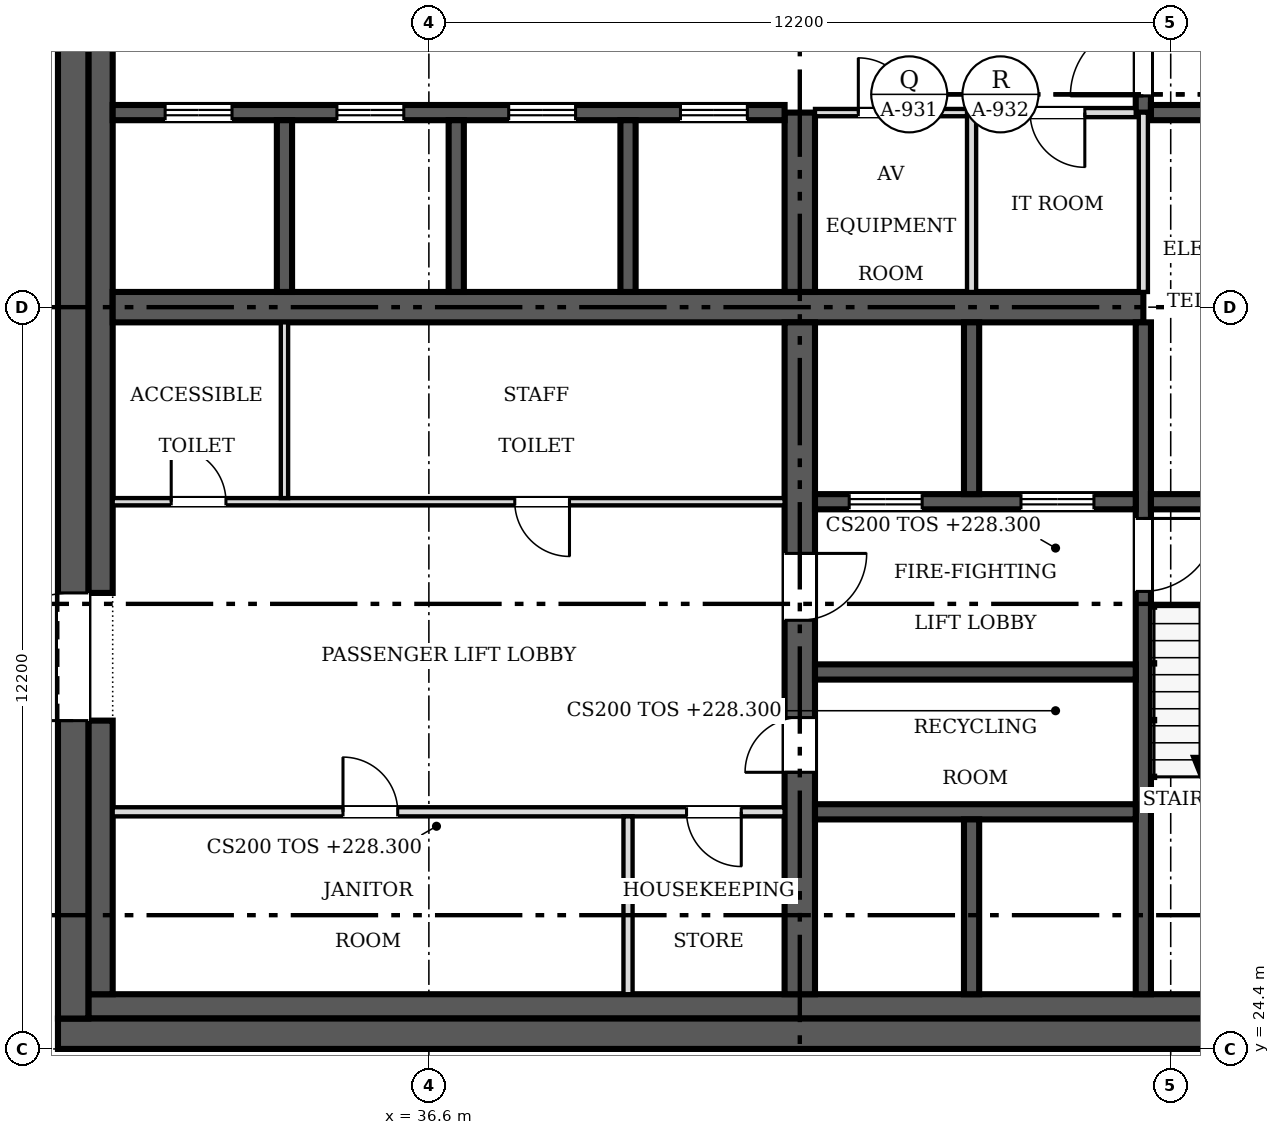
"""IFC4 building model, lengths in metres.
Left out: names, types, materials, properties, quantities, classifications, styles, units other than length and angle.
Written with IfcOpenShell. Run it as: python <this file> out.ifc"""

import sys

from ifc_helpers import new_model, si_unit, direction, frame, frame_2d, origin, place, context, subcontext, project, spatial, rectangle, extrude, source, transform, mapped, element, fill, save


model = new_model("IFC4")
c1 = context("Model", 3, precision=1e-05, world=origin(), true_north=direction((0.0, 1.0)))
c2 = subcontext(c1, "Body", "Model", "MODEL_VIEW")
j1 = project(units=[si_unit("LENGTHUNIT", "METRE"), si_unit("PLANEANGLEUNIT", "RADIAN")], contexts=[c1])
p1 = place(None, origin())
s1 = spatial("IfcSite", under=j1, at=p1, CompositionType="ELEMENT")
p2 = place(p1, origin())
s2 = spatial("IfcBuilding", under=s1, at=p2, CompositionType="ELEMENT")
p3 = place(p2, frame((0.0, 0.0, 228.3)))
s3 = spatial("IfcBuildingStorey", under=s2, at=p3, CompositionType="ELEMENT", Elevation=228.3)
p4 = place(p3, frame((54.9, 24.65, 0.0), z_axis=(0.0, 0.0, 1.0), x_axis=(-1.0, 0.0, 0.0)))
e1 = element("IfcWall", 1, at=p4, inside=s3, PredefinedType="SHEAR", context=c2, shape_type="SweptSolid", body=[
    extrude(rectangle(XDim=24.4, YDim=0.5, at=frame_2d((12.2, 0.0))), origin(), (0.0, 0.0, 1.0), 3.8),
])
m1 = source(origin(), c2, "Body", "SweptSolid", [
    extrude(rectangle(XDim=1.2, YDim=2.1, at=frame_2d((0.6, 1.05))), frame((0.0, 0.26, 0.0), z_axis=(0.0, -1.0, 0.0), x_axis=(1.0, 0.0, 0.0)), (0.0, 0.0, 1.0), 0.52),
])
p5 = place(p4, frame((1.5, 0.0, 0.0)))
e2 = element("IfcOpeningElement", 2, at=p5, cuts=e1, PredefinedType="OPENING", context=c2, shape_type="MappedRepresentation", body=[
    mapped(m1, transform((0.0, 0.0, 0.0), scale=1.0)),
])
p6 = place(p3, frame((30.75, 24.9, 0.0), z_axis=(0.0, 0.0, 1.0), x_axis=(0.0, 1.0, 0.0)))
e3 = element("IfcWall", 3, at=p6, inside=s3, PredefinedType="SHEAR", context=c2, shape_type="SweptSolid", body=[
    extrude(rectangle(XDim=23.4, YDim=0.5, at=frame_2d((11.7, 0.0))), origin(), (0.0, 0.0, 1.0), 3.8),
])
m2 = source(origin(), c2, "Body", "SweptSolid", [
    extrude(rectangle(XDim=2.1, YDim=2.4, at=frame_2d((1.05, 1.2))), frame((0.0, 0.26, 0.0), z_axis=(0.0, -1.0, 0.0), x_axis=(1.0, 0.0, 0.0)), (0.0, 0.0, 1.0), 0.52),
])
p7 = place(p6, frame((4.9, 0.0, 0.0)))
e4 = element("IfcOpeningElement", 4, at=p7, cuts=e3, PredefinedType="OPENING", context=c2, shape_type="MappedRepresentation", body=[
    mapped(m2, transform((0.0, 0.0, 0.0), scale=1.0)),
])
p8 = place(p6, frame((16.4, 0.0, 0.0)))
e5 = element("IfcOpeningElement", 5, at=p8, cuts=e3, PredefinedType="OPENING", context=c2, shape_type="MappedRepresentation", body=[
    mapped(m2, transform((0.0, 0.0, 0.0), scale=1.0)),
])
p9 = place(p3, frame((31.0, 25.1, 0.0), z_axis=(0.0, 0.0, 1.0), x_axis=(1.0, 0.0, 0.0)))
e6 = element("IfcWall", 6, at=p9, inside=s3, PredefinedType="SOLIDWALL", context=c2, shape_type="SweptSolid", body=[
    extrude(rectangle(XDim=21.2, YDim=0.4, at=frame_2d((10.6, 0.0))), origin(), (0.0, 0.0, 1.0), 3.8),
])
p10 = place(p3, frame((31.2, 25.3, 0.0), z_axis=(0.0, 0.0, 1.0), x_axis=(0.0, 1.0, 0.0)))
e7 = element("IfcWall", 7, at=p10, inside=s3, PredefinedType="SOLIDWALL", context=c2, shape_type="SweptSolid", body=[
    extrude(rectangle(XDim=4.5, YDim=0.4, at=frame_2d((2.25, 0.0))), origin(), (0.0, 0.0, 1.0), 3.8),
])
p11 = place(p3, frame((31.2, 31.9, 0.0), z_axis=(0.0, 0.0, 1.0), x_axis=(0.0, 1.0, 0.0)))
e8 = element("IfcWall", 8, at=p11, inside=s3, PredefinedType="SOLIDWALL", context=c2, shape_type="SweptSolid", body=[
    extrude(rectangle(XDim=9.4, YDim=0.4, at=frame_2d((4.7, 0.0))), origin(), (0.0, 0.0, 1.0), 3.8),
])
p12 = place(p3, frame((31.4, 36.6, 0.0), z_axis=(0.0, 0.0, 1.0), x_axis=(1.0, 0.0, 0.0)))
e9 = element("IfcWall", 9, at=p12, inside=s3, PredefinedType="SHEAR", context=c2, shape_type="SweptSolid", body=[
    extrude(rectangle(XDim=16.95, YDim=0.5, at=frame_2d((8.475, 0.0))), origin(), (0.0, 0.0, 1.0), 3.8),
])
p13 = place(p3, frame((42.7, 36.35, 0.0), z_axis=(0.0, 0.0, 1.0), x_axis=(0.0, -1.0, 0.0)))
e10 = element("IfcWall", 10, at=p13, inside=s3, PredefinedType="SHEAR", context=c2, shape_type="SweptSolid", body=[
    extrude(rectangle(XDim=11.05, YDim=0.5, at=frame_2d((5.525, 0.0))), origin(), (0.0, 0.0, 1.0), 3.8),
])
m3 = source(origin(), c2, "Body", "SweptSolid", [
    extrude(rectangle(XDim=0.9, YDim=2.1, at=frame_2d((0.45, 1.05))), frame((0.0, 0.26, 0.0), z_axis=(0.0, -1.0, 0.0), x_axis=(1.0, 0.0, 0.0)), (0.0, 0.0, 1.0), 0.52),
])
p14 = place(p13, frame((6.5, 0.0, 0.0)))
e11 = element("IfcOpeningElement", 11, at=p14, cuts=e10, PredefinedType="OPENING", context=c2, shape_type="MappedRepresentation", body=[
    mapped(m3, transform((0.0, 0.0, 0.0), scale=1.0)),
])
m4 = source(origin(), c2, "Body", "SweptSolid", [
    extrude(rectangle(XDim=1.1, YDim=2.1, at=frame_2d((0.55, 1.05))), frame((0.0, 0.26, 0.0), z_axis=(0.0, -1.0, 0.0), x_axis=(1.0, 0.0, 0.0)), (0.0, 0.0, 1.0), 0.52),
])
p15 = place(p13, frame((3.8, 0.0, 0.0)))
e12 = element("IfcOpeningElement", 12, at=p15, cuts=e10, PredefinedType="OPENING", context=c2, shape_type="MappedRepresentation", body=[
    mapped(m4, transform((0.0, 0.0, 0.0), scale=1.0)),
])
p16 = place(p3, frame((42.7, 36.85, 0.0), z_axis=(0.0, 0.0, 1.0), x_axis=(0.0, 1.0, 0.0)))
e13 = element("IfcWall", 13, at=p16, inside=s3, PredefinedType="SHEAR", context=c2, shape_type="SweptSolid", body=[
    extrude(rectangle(XDim=2.95, YDim=0.5, at=frame_2d((1.475, 0.0))), origin(), (0.0, 0.0, 1.0), 3.8),
])
p17 = place(p3, frame((31.4, 39.8, 0.0), z_axis=(0.0, 0.0, 1.0), x_axis=(1.0, 0.0, 0.0)))
e14 = element("IfcWall", 14, at=p17, inside=s3, PredefinedType="SOLIDWALL", context=c2, shape_type="SweptSolid", body=[
    extrude(rectangle(XDim=11.05, YDim=0.25, at=frame_2d((5.525, 0.0))), origin(), (0.0, 0.0, 1.0), 3.8),
])
m5 = source(origin(), c2, "Body", "SweptSolid", [
    extrude(rectangle(XDim=1.1, YDim=2.1, at=frame_2d((0.55, 1.05))), frame((0.0, 0.135, 0.0), z_axis=(0.0, -1.0, 0.0), x_axis=(1.0, 0.0, 0.0)), (0.0, 0.0, 1.0), 0.27),
])
p18 = place(p17, frame((0.863, 0.0, 0.0)))
e15 = element("IfcOpeningElement", 15, at=p18, cuts=e14, PredefinedType="OPENING", context=c2, shape_type="MappedRepresentation", body=[
    mapped(m5, transform((0.0, 0.0, 0.0), scale=1.0)),
])
p19 = place(p17, frame((3.688, 0.0, 0.0)))
e16 = element("IfcOpeningElement", 16, at=p19, cuts=e14, PredefinedType="OPENING", context=c2, shape_type="MappedRepresentation", body=[
    mapped(m5, transform((0.0, 0.0, 0.0), scale=1.0)),
])
p20 = place(p17, frame((6.512, 0.0, 0.0)))
e17 = element("IfcOpeningElement", 17, at=p20, cuts=e14, PredefinedType="OPENING", context=c2, shape_type="MappedRepresentation", body=[
    mapped(m5, transform((0.0, 0.0, 0.0), scale=1.0)),
])
p21 = place(p17, frame((9.337, 0.0, 0.0)))
e18 = element("IfcOpeningElement", 18, at=p21, cuts=e14, PredefinedType="OPENING", context=c2, shape_type="MappedRepresentation", body=[
    mapped(m5, transform((0.0, 0.0, 0.0), scale=1.0)),
])
p22 = place(p3, frame((48.35, 36.35, 0.0), z_axis=(0.0, 0.0, 1.0), x_axis=(0.0, -1.0, 0.0)))
e19 = element("IfcWall", 19, at=p22, inside=s3, PredefinedType="SOLIDWALL", context=c2, shape_type="SweptSolid", body=[
    extrude(rectangle(XDim=11.05, YDim=0.25, at=frame_2d((5.525, 0.0))), origin(), (0.0, 0.0, 1.0), 3.8),
])
m6 = source(origin(), c2, "Body", "SweptSolid", [
    extrude(rectangle(XDim=1.2, YDim=2.1, at=frame_2d((0.6, 1.05))), frame((0.0, 0.135, 0.0), z_axis=(0.0, -1.0, 0.0), x_axis=(1.0, 0.0, 0.0)), (0.0, 0.0, 1.0), 0.27),
])
p23 = place(p22, frame((3.225, 0.0, 0.0)))
e20 = element("IfcOpeningElement", 20, at=p23, cuts=e19, PredefinedType="OPENING", context=c2, shape_type="MappedRepresentation", body=[
    mapped(m6, transform((0.0, 0.0, 0.0), scale=1.0)),
])
p24 = place(p3, frame((48.225, 33.4, 0.0), z_axis=(0.0, 0.0, 1.0), x_axis=(-1.0, 0.0, 0.0)))
e21 = element("IfcWall", 21, at=p24, inside=s3, PredefinedType="SOLIDWALL", context=c2, shape_type="SweptSolid", body=[
    extrude(rectangle(XDim=5.275, YDim=0.25, at=frame_2d((2.638, 0.0))), origin(), (0.0, 0.0, 1.0), 3.8),
])
p25 = place(p24, frame((3.512, 0.0, 0.0)))
e22 = element("IfcOpeningElement", 22, at=p25, cuts=e21, PredefinedType="OPENING", context=c2, shape_type="MappedRepresentation", body=[
    mapped(m6, transform((0.0, 0.0, 0.0), scale=1.0)),
])
p26 = place(p24, frame((0.688, 0.0, 0.0)))
e23 = element("IfcOpeningElement", 23, at=p26, cuts=e21, PredefinedType="OPENING", context=c2, shape_type="MappedRepresentation", body=[
    mapped(m6, transform((0.0, 0.0, 0.0), scale=1.0)),
])
p27 = place(p3, frame((48.475, 33.4, 0.0), z_axis=(0.0, 0.0, 1.0), x_axis=(1.0, 0.0, 0.0)))
e24 = element("IfcWall", 24, at=p27, inside=s3, PredefinedType="SOLIDWALL", context=c2, shape_type="SweptSolid", body=[
    extrude(rectangle(XDim=3.525, YDim=0.25, at=frame_2d((1.762, 0.0))), origin(), (0.0, 0.0, 1.0), 3.8),
])
p28 = place(p3, frame((48.35, 47.9, 0.0), z_axis=(0.0, 0.0, 1.0), x_axis=(0.0, -1.0, 0.0)))
e25 = element("IfcWall", 25, at=p28, inside=s3, PredefinedType="SOLIDWALL", context=c2, shape_type="SweptSolid", body=[
    extrude(rectangle(XDim=8.1, YDim=0.25, at=frame_2d((4.05, 0.0))), origin(), (0.0, 0.0, 1.0), 3.8),
])
p29 = place(p28, frame((6.625, 0.0, 0.0)))
e26 = element("IfcOpeningElement", 26, at=p29, cuts=e25, PredefinedType="OPENING", context=c2, shape_type="MappedRepresentation", body=[
    mapped(m6, transform((0.0, 0.0, 0.0), scale=1.0)),
])
for number, where, z_axis, x_axis in (
    (27, (42.95, 28.3, 0.0), (0.0, 0.0, 1.0), (1.0, 0.0, 0.0)),
    (28, (42.95, 30.6, 0.0), (0.0, 0.0, 1.0), (1.0, 0.0, 0.0)),
):
    element("IfcWall", number, at=place(p3, frame(where, z_axis=z_axis, x_axis=x_axis)), inside=s3, PredefinedType="SOLIDWALL", context=c2, shape_type="SweptSolid", body=[
        extrude(rectangle(XDim=5.275, YDim=0.25, at=frame_2d((2.638, 0.0))), origin(), (0.0, 0.0, 1.0), 3.8),
    ])
p30 = place(p3, frame((48.475, 39.8, 0.0), z_axis=(0.0, 0.0, 1.0), x_axis=(1.0, 0.0, 0.0)))
e29 = element("IfcWall", 29, at=p30, inside=s3, PredefinedType="SOLIDWALL", context=c2, shape_type="SweptSolid", body=[
    extrude(rectangle(XDim=3.4, YDim=0.25, at=frame_2d((1.7, 0.0))), origin(), (0.0, 0.0, 1.0), 3.8),
])
for number, where, z_axis, x_axis in (
    (30, (34.225, 36.85, 0.0), (0.0, 0.0, 1.0), (0.0, 1.0, 0.0)),
    (31, (37.05, 36.85, 0.0), (0.0, 0.0, 1.0), (0.0, 1.0, 0.0)),
    (32, (39.875, 36.85, 0.0), (0.0, 0.0, 1.0), (0.0, 1.0, 0.0)),
):
    element("IfcWall", number, at=place(p3, frame(where, z_axis=z_axis, x_axis=x_axis)), inside=s3, PredefinedType="SOLIDWALL", context=c2, shape_type="SweptSolid", body=[
        extrude(rectangle(XDim=2.825, YDim=0.25, at=frame_2d((1.413, 0.0))), origin(), (0.0, 0.0, 1.0), 3.8),
    ])
p31 = place(p3, frame((45.525, 33.525, 0.0), z_axis=(0.0, 0.0, 1.0), x_axis=(0.0, 1.0, 0.0)))
e33 = element("IfcWall", 33, at=p31, inside=s3, PredefinedType="SOLIDWALL", context=c2, shape_type="SweptSolid", body=[
    extrude(rectangle(XDim=2.825, YDim=0.25, at=frame_2d((1.413, 0.0))), origin(), (0.0, 0.0, 1.0), 3.8),
])
p32 = place(p3, frame((45.525, 25.3, 0.0), z_axis=(0.0, 0.0, 1.0), x_axis=(0.0, 1.0, 0.0)))
e34 = element("IfcWall", 34, at=p32, inside=s3, PredefinedType="SOLIDWALL", context=c2, shape_type="SweptSolid", body=[
    extrude(rectangle(XDim=2.875, YDim=0.25, at=frame_2d((1.438, 0.0))), origin(), (0.0, 0.0, 1.0), 3.8),
])
p33 = place(p3, frame((42.45, 28.3, 0.0), z_axis=(0.0, 0.0, 1.0), x_axis=(-1.0, 0.0, 0.0)))
e35 = element("IfcWall", 35, at=p33, inside=s3, PredefinedType="PARTITIONING", context=c2, shape_type="SweptSolid", body=[
    extrude(rectangle(XDim=11.05, YDim=0.15, at=frame_2d((5.525, 0.0))), origin(), (0.0, 0.0, 1.0), 3.5),
])
m7 = source(origin(), c2, "Body", "SweptSolid", [
    extrude(rectangle(XDim=0.9, YDim=2.1, at=frame_2d((0.45, 1.05))), frame((0.0, 0.085, 0.0), z_axis=(0.0, -1.0, 0.0), x_axis=(1.0, 0.0, 0.0)), (0.0, 0.0, 1.0), 0.17),
])
p34 = place(p33, frame((6.363, 0.0, 0.0)))
e36 = element("IfcOpeningElement", 36, at=p34, cuts=e35, PredefinedType="OPENING", context=c2, shape_type="MappedRepresentation", body=[
    mapped(m7, transform((0.0, 0.0, 0.0), scale=1.0)),
])
p35 = place(p33, frame((0.712, 0.0, 0.0)))
e37 = element("IfcOpeningElement", 37, at=p35, cuts=e35, PredefinedType="OPENING", context=c2, shape_type="MappedRepresentation", body=[
    mapped(m7, transform((0.0, 0.0, 0.0), scale=1.0)),
])
p36 = place(p3, frame((31.4, 33.4, 0.0), z_axis=(0.0, 0.0, 1.0), x_axis=(1.0, 0.0, 0.0)))
e38 = element("IfcWall", 38, at=p36, inside=s3, PredefinedType="PARTITIONING", context=c2, shape_type="SweptSolid", body=[
    extrude(rectangle(XDim=11.05, YDim=0.12, at=frame_2d((5.525, 0.0))), origin(), (0.0, 0.0, 1.0), 3.5),
])
m8 = source(origin(), c2, "Body", "SweptSolid", [
    extrude(rectangle(XDim=0.9, YDim=2.1, at=frame_2d((0.45, 1.05))), frame((0.0, 0.07, 0.0), z_axis=(0.0, -1.0, 0.0), x_axis=(1.0, 0.0, 0.0)), (0.0, 0.0, 1.0), 0.14),
])
p37 = place(p36, frame((0.962, 0.0, 0.0)))
e39 = element("IfcOpeningElement", 39, at=p37, cuts=e38, PredefinedType="OPENING", context=c2, shape_type="MappedRepresentation", body=[
    mapped(m8, transform((0.0, 0.0, 0.0), scale=1.0)),
])
p38 = place(p36, frame((6.613, 0.0, 0.0)))
e40 = element("IfcOpeningElement", 40, at=p38, cuts=e38, PredefinedType="OPENING", context=c2, shape_type="MappedRepresentation", body=[
    mapped(m8, transform((0.0, 0.0, 0.0), scale=1.0)),
])
for number, where, z_axis, x_axis in (
    (41, (45.525, 36.85, 0.0), (0.0, 0.0, 1.0), (0.0, 1.0, 0.0)),
    (42, (48.35, 36.85, 0.0), (0.0, 0.0, 1.0), (0.0, 1.0, 0.0)),
):
    element("IfcWall", number, at=place(p3, frame(where, z_axis=z_axis, x_axis=x_axis)), inside=s3, PredefinedType="PARTITIONING", context=c2, shape_type="SweptSolid", body=[
        extrude(rectangle(XDim=2.95, YDim=0.15, at=frame_2d((1.475, 0.0))), origin(), (0.0, 0.0, 1.0), 3.5),
    ])
p39 = place(p3, frame((34.225, 33.46, 0.0), z_axis=(0.0, 0.0, 1.0), x_axis=(0.0, 1.0, 0.0)))
e43 = element("IfcWall", 43, at=p39, inside=s3, PredefinedType="PARTITIONING", context=c2, shape_type="SweptSolid", body=[
    extrude(rectangle(XDim=2.89, YDim=0.12, at=frame_2d((1.445, 0.0))), origin(), (0.0, 0.0, 1.0), 3.5),
])
p40 = place(p3, frame((39.875, 25.3, 0.0), z_axis=(0.0, 0.0, 1.0), x_axis=(0.0, 1.0, 0.0)))
e44 = element("IfcWall", 44, at=p40, inside=s3, PredefinedType="PARTITIONING", context=c2, shape_type="SweptSolid", body=[
    extrude(rectangle(XDim=2.925, YDim=0.15, at=frame_2d((1.462, 0.0))), origin(), (0.0, 0.0, 1.0), 3.5),
])
p41 = place(p3, frame((45.45, 39.8, 0.0), z_axis=(0.0, 0.0, 1.0), x_axis=(-1.0, 0.0, 0.0)))
e45 = element("IfcWall", 45, at=p41, inside=s3, PredefinedType="PARTITIONING", context=c2, shape_type="SweptSolid", body=[
    extrude(rectangle(XDim=2.5, YDim=0.12, at=frame_2d((1.25, 0.0))), origin(), (0.0, 0.0, 1.0), 3.5),
])
p42 = place(p41, frame((0.887, 0.0, 0.0)))
e46 = element("IfcOpeningElement", 46, at=p42, cuts=e45, PredefinedType="OPENING", context=c2, shape_type="MappedRepresentation", body=[
    mapped(m8, transform((0.0, 0.0, 0.0), scale=1.0)),
])
p43 = place(p3, frame((48.225, 39.8, 0.0), z_axis=(0.0, 0.0, 1.0), x_axis=(-1.0, 0.0, 0.0)))
e47 = element("IfcWall", 47, at=p43, inside=s3, PredefinedType="PARTITIONING", context=c2, shape_type="SweptSolid", body=[
    extrude(rectangle(XDim=2.625, YDim=0.15, at=frame_2d((1.312, 0.0))), origin(), (0.0, 0.0, 1.0), 3.5),
])
p44 = place(p43, frame((0.837, 0.0, 0.0)))
e48 = element("IfcOpeningElement", 48, at=p44, cuts=e47, PredefinedType="OPENING", context=c2, shape_type="MappedRepresentation", body=[
    mapped(m7, transform((0.0, 0.0, 0.0), scale=1.0)),
])
m9 = source(origin(), c2, "Body", "SweptSolid", [
    extrude(rectangle(XDim=2.1, YDim=2.4, at=frame_2d((1.05, 1.2))), frame((0.0, 0.025, 0.0), z_axis=(0.0, -1.0, 0.0), x_axis=(1.0, 0.0, 0.0)), (0.0, 0.0, 1.0), 0.05),
])
p45 = place(p7, origin())
e49 = element("IfcDoor", 49, at=p45, inside=s3, OperationType="DOUBLE_DOOR_SINGLE_SWING", PredefinedType="DOOR", context=c2, shape_type="MappedRepresentation", body=[
    mapped(m9, transform((0.0, 0.0, 0.0), scale=1.0)),
])
fill(e4, e49)
m10 = source(origin(), c2, "Body", "SweptSolid", [
    extrude(rectangle(XDim=0.9, YDim=2.1, at=frame_2d((0.45, 1.05))), frame((0.0, 0.025, 0.0), z_axis=(0.0, -1.0, 0.0), x_axis=(1.0, 0.0, 0.0)), (0.0, 0.0, 1.0), 0.05),
])
p46 = place(p14, origin())
e50 = element("IfcDoor", 50, at=p46, inside=s3, OperationType="SINGLE_SWING_RIGHT", PredefinedType="DOOR", context=c2, shape_type="MappedRepresentation", body=[
    mapped(m10, transform((0.0, 0.0, 0.0), scale=1.0)),
])
fill(e11, e50)
m11 = source(origin(), c2, "Body", "SweptSolid", [
    extrude(rectangle(XDim=1.1, YDim=2.1, at=frame_2d((0.55, 1.05))), frame((0.0, 0.025, 0.0), z_axis=(0.0, -1.0, 0.0), x_axis=(1.0, 0.0, 0.0)), (0.0, 0.0, 1.0), 0.05),
])
p47 = place(p15, origin())
e51 = element("IfcDoor", 51, at=p47, inside=s3, OperationType="SINGLE_SWING_LEFT", PredefinedType="DOOR", context=c2, shape_type="MappedRepresentation", body=[
    mapped(m11, transform((0.0, 0.0, 0.0), scale=1.0)),
])
fill(e12, e51)
p48 = place(p18, origin())
e52 = element("IfcDoor", 52, at=p48, inside=s3, OperationType="DOUBLE_DOOR_SLIDING", PredefinedType="DOOR", context=c2, shape_type="MappedRepresentation", body=[
    mapped(m11, transform((0.0, 0.0, 0.0), scale=1.0)),
])
fill(e15, e52)
p49 = place(p19, origin())
e53 = element("IfcDoor", 53, at=p49, inside=s3, OperationType="DOUBLE_DOOR_SLIDING", PredefinedType="DOOR", context=c2, shape_type="MappedRepresentation", body=[
    mapped(m11, transform((0.0, 0.0, 0.0), scale=1.0)),
])
fill(e16, e53)
p50 = place(p20, origin())
e54 = element("IfcDoor", 54, at=p50, inside=s3, OperationType="DOUBLE_DOOR_SLIDING", PredefinedType="DOOR", context=c2, shape_type="MappedRepresentation", body=[
    mapped(m11, transform((0.0, 0.0, 0.0), scale=1.0)),
])
fill(e17, e54)
p51 = place(p21, origin())
e55 = element("IfcDoor", 55, at=p51, inside=s3, OperationType="DOUBLE_DOOR_SLIDING", PredefinedType="DOOR", context=c2, shape_type="MappedRepresentation", body=[
    mapped(m11, transform((0.0, 0.0, 0.0), scale=1.0)),
])
fill(e18, e55)
m12 = source(origin(), c2, "Body", "SweptSolid", [
    extrude(rectangle(XDim=1.2, YDim=2.1, at=frame_2d((0.6, 1.05))), frame((0.0, 0.025, 0.0), z_axis=(0.0, -1.0, 0.0), x_axis=(1.0, 0.0, 0.0)), (0.0, 0.0, 1.0), 0.05),
])
p52 = place(p23, origin())
e56 = element("IfcDoor", 56, at=p52, inside=s3, OperationType="SINGLE_SWING_LEFT", PredefinedType="DOOR", context=c2, shape_type="MappedRepresentation", body=[
    mapped(m12, transform((0.0, 0.0, 0.0), scale=1.0)),
])
fill(e20, e56)
p53 = place(p25, origin())
e57 = element("IfcDoor", 57, at=p53, inside=s3, OperationType="DOUBLE_DOOR_SLIDING", PredefinedType="DOOR", context=c2, shape_type="MappedRepresentation", body=[
    mapped(m12, transform((0.0, 0.0, 0.0), scale=1.0)),
])
fill(e22, e57)
p54 = place(p26, origin())
e58 = element("IfcDoor", 58, at=p54, inside=s3, OperationType="DOUBLE_DOOR_SLIDING", PredefinedType="DOOR", context=c2, shape_type="MappedRepresentation", body=[
    mapped(m12, transform((0.0, 0.0, 0.0), scale=1.0)),
])
fill(e23, e58)
p55 = place(p29, origin())
e59 = element("IfcDoor", 59, at=p55, inside=s3, OperationType="SINGLE_SWING_RIGHT", PredefinedType="DOOR", context=c2, shape_type="MappedRepresentation", body=[
    mapped(m12, transform((0.0, 0.0, 0.0), scale=1.0)),
])
fill(e26, e59)
p56 = place(p34, origin())
e60 = element("IfcDoor", 60, at=p56, inside=s3, OperationType="SINGLE_SWING_RIGHT", PredefinedType="DOOR", context=c2, shape_type="MappedRepresentation", body=[
    mapped(m10, transform((0.0, 0.0, 0.0), scale=1.0)),
])
fill(e36, e60)
p57 = place(p35, origin())
e61 = element("IfcDoor", 61, at=p57, inside=s3, OperationType="SINGLE_SWING_LEFT", PredefinedType="DOOR", context=c2, shape_type="MappedRepresentation", body=[
    mapped(m10, transform((0.0, 0.0, 0.0), scale=1.0)),
])
fill(e37, e61)
p58 = place(p37, origin())
e62 = element("IfcDoor", 62, at=p58, inside=s3, OperationType="SINGLE_SWING_LEFT", PredefinedType="DOOR", context=c2, shape_type="MappedRepresentation", body=[
    mapped(m10, transform((0.0, 0.0, 0.0), scale=1.0)),
])
fill(e39, e62)
p59 = place(p38, origin())
e63 = element("IfcDoor", 63, at=p59, inside=s3, OperationType="SINGLE_SWING_RIGHT", PredefinedType="DOOR", context=c2, shape_type="MappedRepresentation", body=[
    mapped(m10, transform((0.0, 0.0, 0.0), scale=1.0)),
])
fill(e40, e63)
p60 = place(p42, origin())
e64 = element("IfcDoor", 64, at=p60, inside=s3, OperationType="SINGLE_SWING_RIGHT", PredefinedType="DOOR", context=c2, shape_type="MappedRepresentation", body=[
    mapped(m10, transform((0.0, 0.0, 0.0), scale=1.0)),
])
fill(e46, e64)
p61 = place(p44, origin())
e65 = element("IfcDoor", 65, at=p61, inside=s3, OperationType="SINGLE_SWING_LEFT", PredefinedType="DOOR", context=c2, shape_type="MappedRepresentation", body=[
    mapped(m10, transform((0.0, 0.0, 0.0), scale=1.0)),
])
fill(e48, e65)
save(model, sys.argv[1])
